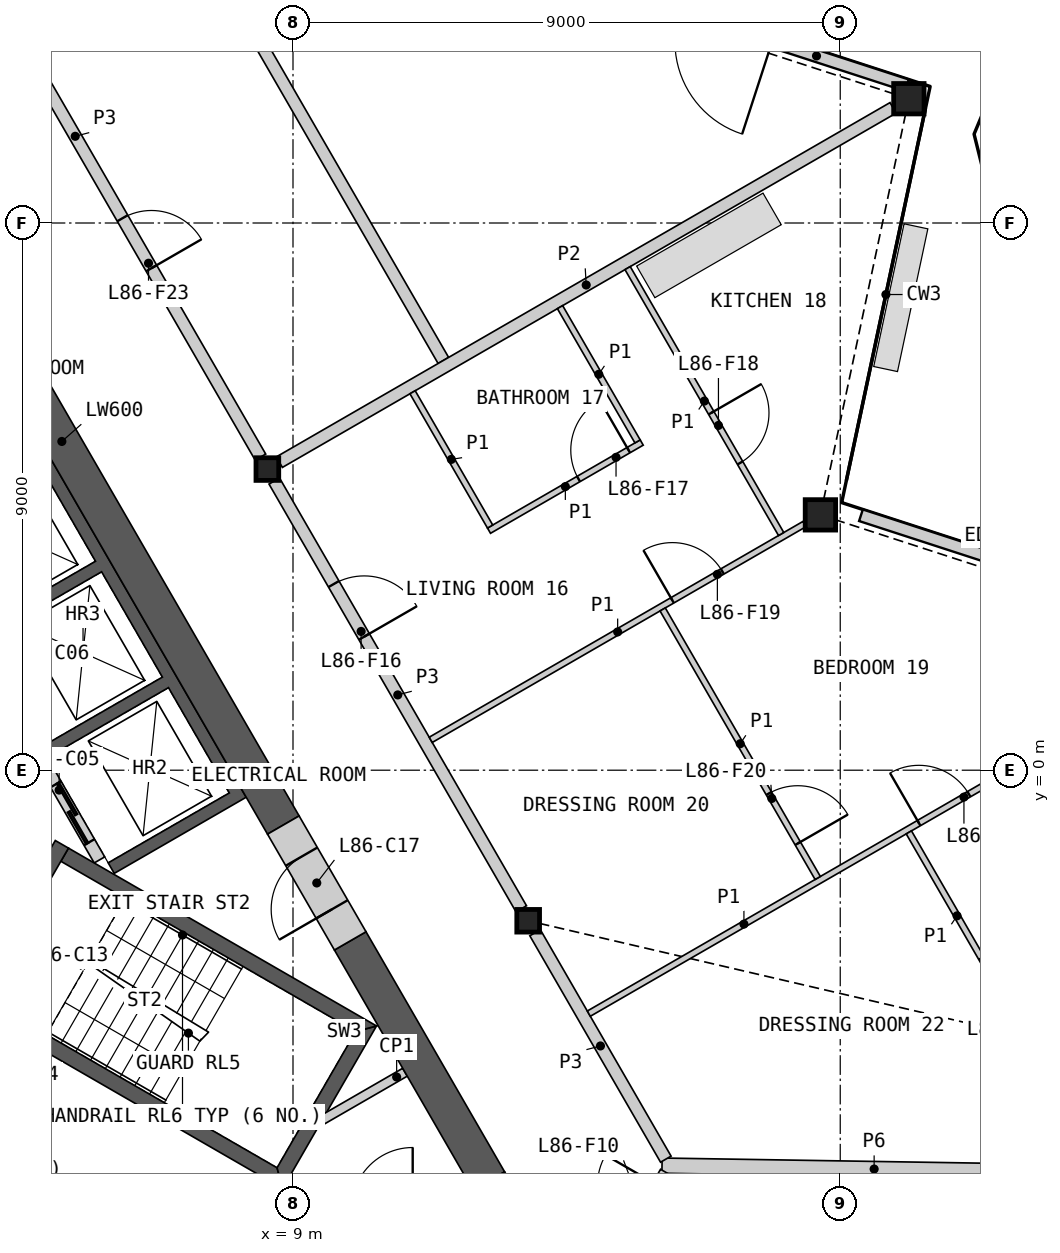
"""IFC4 building model, lengths in metres.
Left out: names, types, materials, properties, quantities, classifications, styles, units other than length and angle.
Written with IfcOpenShell. Run it as: python <this file> out.ifc"""

import sys

from ifc_helpers import new_model, si_unit, direction, frame, frame_2d, origin, origin_2d, place, context, subcontext, project, spatial, polyline, rectangle, hollow_rectangle, i_section, outline, extrude, element, fill, save


model = new_model("IFC4")
c1 = context("Model", 3, precision=1e-05, world=origin(), true_north=direction((0.0, 1.0)))
c2 = subcontext(c1, "Body", "Model", "MODEL_VIEW")
j1 = project(units=[si_unit("LENGTHUNIT", "METRE"), si_unit("PLANEANGLEUNIT", "RADIAN")], contexts=[c1])
p1 = place(None, origin())
s1 = spatial("IfcSite", under=j1, at=p1, CompositionType="ELEMENT")
p2 = place(p1, origin())
s2 = spatial("IfcBuilding", under=s1, at=p2, CompositionType="ELEMENT")
p3 = place(p2, frame((0.0, 0.0, 381.4)))
s3 = spatial("IfcBuildingStorey", under=s2, at=p3, CompositionType="ELEMENT", Elevation=381.4)
for number, where, z_axis, x_axis in (
    (1, (17.674, 4.199, 0.0), (0.0, 0.0, 1.0), (1.0, 0.0, 0.0)),
    (2, (19.129, 11.044, 0.0), (0.0, 0.0, 1.0), (1.0, 0.0, 0.0)),
):
    element("IfcColumn", number, at=place(p3, frame(where, z_axis=z_axis, x_axis=x_axis)), inside=s3, PredefinedType="COLUMN", context=c2, shape_type="SweptSolid", body=[
        extrude(hollow_rectangle(XDim=0.5, YDim=0.5, WallThickness=0.03, at=origin_2d()), origin(), (0.0, 0.0, 1.0), 3.4),
    ])
for number, where, z_axis, x_axis in (
    (3, (12.868, -2.476, 0.0), (0.0, 0.0, 1.0), (1.0, 0.0, 0.0)),
    (4, (8.578, 4.953, 0.0), (0.0, 0.0, 1.0), (1.0, 0.0, 0.0)),
):
    element("IfcColumn", number, at=place(p3, frame(where, z_axis=z_axis, x_axis=x_axis)), inside=s3, PredefinedType="COLUMN", context=c2, shape_type="SweptSolid", body=[
        extrude(i_section(OverallWidth=0.374, OverallDepth=0.372, WebThickness=0.016, FlangeThickness=0.026, at=origin_2d()), origin(), (0.0, 0.0, 1.0), 3.4),
    ])
p4 = place(p3, frame((24.3, 2.257, 0.0), z_axis=(0.0, 0.0, 1.0), x_axis=(-0.951060123915, 0.309005891041, 0.0)))
e5 = element("IfcWall", 5, at=p4, inside=s3, PredefinedType="SOLIDWALL", context=c2, shape_type="SweptSolid", body=[
    extrude(rectangle(XDim=6.265, YDim=0.2, at=frame_2d((3.133, 0.0))), origin(), (0.0, 0.0, 1.0), 2.634),
])
p5 = place(p4, frame((2.333, 0.0, 0.0)))
e6 = element("IfcOpeningElement", 6, at=p5, cuts=e5, PredefinedType="OPENING", context=c2, shape_type="SweptSolid", body=[
    extrude(rectangle(XDim=1.6, YDim=2.25, at=frame_2d((0.8, 1.125))), frame((0.0, 0.11, 0.0), z_axis=(0.0, -1.0, 0.0), x_axis=(1.0, 0.0, 0.0)), (0.0, 0.0, 1.0), 0.22),
])
p6 = place(p3, frame((19.099, 11.264, 0.0), z_axis=(0.0, 0.0, 1.0), x_axis=(-0.951056402988, 0.3090173431, 0.0)))
e7 = element("IfcWall", 7, at=p6, inside=s3, PredefinedType="SOLIDWALL", context=c2, shape_type="SweptSolid", body=[
    extrude(rectangle(XDim=6.265, YDim=0.2, at=frame_2d((3.133, 0.0))), origin(), (0.0, 0.0, 1.0), 2.634),
])
p7 = place(p6, frame((2.333, 0.0, 0.0)))
e8 = element("IfcOpeningElement", 8, at=p7, cuts=e7, PredefinedType="OPENING", context=c2, shape_type="SweptSolid", body=[
    extrude(rectangle(XDim=1.6, YDim=2.25, at=frame_2d((0.8, 1.125))), frame((0.0, 0.11, 0.0), z_axis=(0.0, -1.0, 0.0), x_axis=(1.0, 0.0, 0.0)), (0.0, 0.0, 1.0), 0.22),
])
p8 = place(p3, origin())
e9 = element("IfcWall", 9, at=p8, inside=s3, PredefinedType="SHEAR", context=c2, shape_type="SweptSolid", body=[
    extrude(outline(polyline([(1.561, 6.097), (3.731, 7.35), (8.231, -0.444), (6.061, -1.697), (5.96, -1.524), (7.952, -0.374), (6.952, 1.358), (4.96, 0.208), (4.861, 0.381), (6.852, 1.531), (5.852, 3.263), (3.861, 2.113), (3.76, 2.287), (5.752, 3.437), (4.752, 5.169), (2.76, 4.019), (2.66, 4.192), (4.652, 5.342), (3.652, 7.074), (1.66, 5.924), (1.561, 6.097)])), origin(), (0.0, 0.0, 1.0), 3.1),
])
p9 = place(p3, frame((5.817, -1.476, 0.0), z_axis=(0.0, 0.0, 1.0), x_axis=(-0.500002616675, 0.866023893041, 0.0)))
e10 = element("IfcWall", 10, at=p9, inside=s3, PredefinedType="SOLIDWALL", context=c2, shape_type="SweptSolid", body=[
    extrude(rectangle(XDim=8.373, YDim=0.2, at=frame_2d((4.187, 0.0))), origin(), (0.0, 0.0, 1.0), 3.1),
])
p10 = place(p9, frame((0.337, 0.0, 0.0)))
e11 = element("IfcOpeningElement", 11, at=p10, cuts=e10, PredefinedType="OPENING", context=c2, shape_type="SweptSolid", body=[
    extrude(rectangle(XDim=1.1, YDim=2.1, at=frame_2d((0.55, 1.05))), frame((0.0, 0.11, 0.0), z_axis=(0.0, -1.0, 0.0), x_axis=(1.0, 0.0, 0.0)), (0.0, 0.0, 1.0), 0.22),
])
p11 = place(p9, frame((2.537, 0.0, 0.0)))
e12 = element("IfcOpeningElement", 12, at=p11, cuts=e10, PredefinedType="OPENING", context=c2, shape_type="SweptSolid", body=[
    extrude(rectangle(XDim=1.1, YDim=2.1, at=frame_2d((0.55, 1.05))), frame((0.0, 0.11, 0.0), z_axis=(0.0, -1.0, 0.0), x_axis=(1.0, 0.0, 0.0)), (0.0, 0.0, 1.0), 0.22),
])
p12 = place(p9, frame((4.737, 0.0, 0.0)))
e13 = element("IfcOpeningElement", 13, at=p12, cuts=e10, PredefinedType="OPENING", context=c2, shape_type="SweptSolid", body=[
    extrude(rectangle(XDim=1.1, YDim=2.1, at=frame_2d((0.55, 1.05))), frame((0.0, 0.11, 0.0), z_axis=(0.0, -1.0, 0.0), x_axis=(1.0, 0.0, 0.0)), (0.0, 0.0, 1.0), 0.22),
])
p13 = place(p9, frame((7.037, 0.0, 0.0)))
e14 = element("IfcOpeningElement", 14, at=p13, cuts=e10, PredefinedType="OPENING", context=c2, shape_type="SweptSolid", body=[
    extrude(rectangle(XDim=0.9, YDim=2.1, at=frame_2d((0.45, 1.05))), frame((0.0, 0.11, 0.0), z_axis=(0.0, -1.0, 0.0), x_axis=(1.0, 0.0, 0.0)), (0.0, 0.0, 1.0), 0.22),
])
p14 = place(p3, origin())
e15 = element("IfcWall", 15, at=p14, inside=s3, PredefinedType="SHEAR", context=c2, shape_type="SweptSolid", body=[
    extrude(outline(polyline([(3.763, -3.956), (8.83, -6.881), (8.738, -6.539), (3.888, -3.739), (3.763, -3.956)])), origin(), (0.0, 0.0, 1.0), 3.1),
])
p15 = place(p3, origin())
e16 = element("IfcWall", 16, at=p15, inside=s3, PredefinedType="SHEAR", context=c2, shape_type="SweptSolid", body=[
    extrude(outline(polyline([(8.83, -6.881), (10.374, -4.206), (10.032, -4.298), (8.738, -6.539), (8.83, -6.881)])), origin(), (0.0, 0.0, 1.0), 3.1),
])
p16 = place(p3, origin())
e17 = element("IfcWall", 17, at=p16, inside=s3, PredefinedType="SHEAR", context=c2, shape_type="SweptSolid", body=[
    extrude(outline(polyline([(10.032, -4.298), (10.374, -4.206), (5.307, -1.281), (5.182, -1.498), (10.032, -4.298)])), origin(), (0.0, 0.0, 1.0), 3.1),
])
p17 = place(p3, frame((3.655, -3.893, 0.0), z_axis=(0.0, 0.0, 1.0), x_axis=(0.499982516597, 0.866035497597, 0.0)))
e18 = element("IfcWall", 18, at=p17, inside=s3, PredefinedType="SHEAR", context=c2, shape_type="SweptSolid", body=[
    extrude(rectangle(XDim=3.088, YDim=0.25, at=frame_2d((1.544, 0.0))), origin(), (0.0, 0.0, 1.0), 3.1),
])
p18 = place(p17, frame((0.994, 0.0, 0.0)))
e19 = element("IfcOpeningElement", 19, at=p18, cuts=e18, PredefinedType="OPENING", context=c2, shape_type="SweptSolid", body=[
    extrude(rectangle(XDim=1.1, YDim=2.1, at=frame_2d((0.55, 1.05))), frame((0.0, 0.135, 0.0), z_axis=(0.0, -1.0, 0.0), x_axis=(1.0, 0.0, 0.0)), (0.0, 0.0, 1.0), 0.27),
])
p19 = place(p3, frame((10.842, -4.967, 0.0), z_axis=(0.0, 0.0, 1.0), x_axis=(-0.866098216386, -0.499873863663, 0.0)))
e20 = element("IfcWall", 20, at=p19, inside=s3, PredefinedType="PARTITIONING", context=c2, shape_type="SweptSolid", body=[
    extrude(rectangle(XDim=1.582, YDim=0.15, at=frame_2d((0.791, 0.0))), origin(), (0.0, 0.0, 1.0), 3.1),
])
p20 = place(p3, frame((8.841, -0.902, 0.0), z_axis=(0.0, 0.0, 1.0), x_axis=(-0.499995618375, 0.866027933502, 0.0)))
e21 = element("IfcWall", 21, at=p20, inside=s3, PredefinedType="SHEAR", context=c2, shape_type="SweptSolid", body=[
    extrude(rectangle(XDim=14.571, YDim=0.6, at=frame_2d((7.285, 0.0))), origin(), (0.0, 0.0, 1.0), 3.1),
])
p21 = place(p3, frame((12.221, -6.756, 0.0), z_axis=(0.0, 0.0, 1.0), x_axis=(-0.500020646047, 0.866013483456, 0.0)))
e22 = element("IfcWall", 22, at=p21, inside=s3, PredefinedType="SHEAR", context=c2, shape_type="SweptSolid", body=[
    extrude(rectangle(XDim=4.559, YDim=0.6, at=frame_2d((2.28, 0.0))), origin(), (0.0, 0.0, 1.0), 3.1),
])
p22 = place(p3, origin())
e23 = element("IfcWall", 23, at=p22, inside=s3, PredefinedType="SHEAR", context=c2, shape_type="SweptSolid", body=[
    extrude(outline(polyline([(11.961, -7.506), (11.961, -6.906), (12.48, -6.606), (13.0, -7.506), (11.961, -7.506)])), origin(), (0.0, 0.0, 1.0), 3.1),
])
p23 = place(p3, frame((9.941, -2.807, 0.0), z_axis=(0.0, 0.0, 1.0), x_axis=(-0.499994660107, 0.866028486751, 0.0)))
e24 = element("IfcWall", 24, at=p23, inside=s3, PredefinedType="SHEAR", context=c2, shape_type="SweptSolid", body=[
    extrude(rectangle(XDim=2.2, YDim=0.6, at=frame_2d((1.1, 0.0))), origin(), (0.0, 0.0, 1.0), 3.1),
])
p24 = place(p23, frame((0.6, 0.0, 0.0)))
e25 = element("IfcOpeningElement", 25, at=p24, cuts=e24, PredefinedType="OPENING", context=c2, shape_type="SweptSolid", body=[
    extrude(rectangle(XDim=1.0, YDim=2.1, at=frame_2d((0.5, 1.05))), frame((0.0, 0.31, 0.0), z_axis=(0.0, -1.0, 0.0), x_axis=(1.0, 0.0, 0.0)), (0.0, 0.0, 1.0), 0.62),
])
p25 = place(p3, frame((15.069, -6.503, 0.0), z_axis=(0.0, 0.0, 1.0), x_axis=(0.999870484296, -0.016093931549, 0.0)))
e26 = element("IfcWall", 26, at=p25, inside=s3, PredefinedType="PARTITIONING", context=c2, shape_type="SweptSolid", body=[
    extrude(rectangle(XDim=13.956, YDim=0.25, at=frame_2d((6.978, 0.0))), origin(), (0.0, 0.0, 1.0), 2.33),
])
p26 = place(p3, frame((4.403, 12.185, 0.0), z_axis=(0.0, 0.0, 1.0), x_axis=(0.499992155518, -0.866029932751, 0.0)))
e27 = element("IfcWall", 27, at=p26, inside=s3, PredefinedType="PARTITIONING", context=c2, shape_type="SweptSolid", body=[
    extrude(rectangle(XDim=8.123, YDim=0.2, at=frame_2d((4.062, 0.0))), origin(), (0.0, 0.0, 1.0), 3.1),
])
p27 = place(p26, frame((3.587, 0.0, 0.0)))
e28 = element("IfcOpeningElement", 28, at=p27, cuts=e27, PredefinedType="OPENING", context=c2, shape_type="SweptSolid", body=[
    extrude(rectangle(XDim=0.95, YDim=2.1, at=frame_2d((0.475, 1.05))), frame((0.0, 0.11, 0.0), z_axis=(0.0, -1.0, 0.0), x_axis=(1.0, 0.0, 0.0)), (0.0, 0.0, 1.0), 0.22),
])
p28 = place(p3, frame((8.692, 4.756, 0.0), z_axis=(0.0, 0.0, 1.0), x_axis=(0.500001682468, -0.866024432409, 0.0)))
e29 = element("IfcWall", 29, at=p28, inside=s3, PredefinedType="PARTITIONING", context=c2, shape_type="SweptSolid", body=[
    extrude(rectangle(XDim=8.124, YDim=0.2, at=frame_2d((4.062, 0.0))), origin(), (0.0, 0.0, 1.0), 3.1),
])
p29 = place(p28, frame((1.956, 0.0, 0.0)))
e30 = element("IfcOpeningElement", 30, at=p29, cuts=e29, PredefinedType="OPENING", context=c2, shape_type="SweptSolid", body=[
    extrude(rectangle(XDim=1.0, YDim=2.1, at=frame_2d((0.5, 1.05))), frame((0.0, 0.11, 0.0), z_axis=(0.0, -1.0, 0.0), x_axis=(1.0, 0.0, 0.0)), (0.0, 0.0, 1.0), 0.22),
])
p30 = place(p3, frame((12.981, -2.673, 0.0), z_axis=(0.0, 0.0, 1.0), x_axis=(0.499986217557, -0.866033360935, 0.0)))
e31 = element("IfcWall", 31, at=p30, inside=s3, PredefinedType="PARTITIONING", context=c2, shape_type="SweptSolid", body=[
    extrude(rectangle(XDim=4.3, YDim=0.2, at=frame_2d((2.15, 0.0))), origin(), (0.0, 0.0, 1.0), 3.1),
])
p31 = place(p3, frame((13.281, -9.819, 0.0), z_axis=(0.0, 0.0, 1.0), x_axis=(0.499948957823, 0.866054870994, 0.0)))
e32 = element("IfcWall", 32, at=p31, inside=s3, PredefinedType="PARTITIONING", context=c2, shape_type="SweptSolid", body=[
    extrude(rectangle(XDim=3.701, YDim=0.2, at=frame_2d((1.851, 0.0))), origin(), (0.0, 0.0, 1.0), 3.1),
])
p32 = place(p31, frame((2.451, 0.0, 0.0)))
e33 = element("IfcOpeningElement", 33, at=p32, cuts=e32, PredefinedType="OPENING", context=c2, shape_type="SweptSolid", body=[
    extrude(rectangle(XDim=1.0, YDim=2.1, at=frame_2d((0.5, 1.05))), frame((0.0, 0.11, 0.0), z_axis=(0.0, -1.0, 0.0), x_axis=(1.0, 0.0, 0.0)), (0.0, 0.0, 1.0), 0.22),
])
p33 = place(p3, frame((3.926, 19.811, 0.0), z_axis=(0.0, 0.0, 1.0), x_axis=(0.500001082559, -0.866024778768, 0.0)))
e34 = element("IfcWall", 34, at=p33, inside=s3, PredefinedType="PARTITIONING", context=c2, shape_type="SweptSolid", body=[
    extrude(rectangle(XDim=15.094, YDim=0.2, at=frame_2d((7.547, 0.0))), origin(), (0.0, 0.0, 1.0), 2.33),
])
p34 = place(p33, frame((3.761, 0.0, 0.0)))
e35 = element("IfcOpeningElement", 35, at=p34, cuts=e34, PredefinedType="OPENING", context=c2, shape_type="SweptSolid", body=[
    extrude(rectangle(XDim=0.95, YDim=2.1, at=frame_2d((0.475, 1.05))), frame((0.0, 0.11, 0.0), z_axis=(0.0, -1.0, 0.0), x_axis=(1.0, 0.0, 0.0)), (0.0, 0.0, 1.0), 0.22),
])
p35 = place(p3, frame((8.775, 5.066, 0.0), z_axis=(0.0, 0.0, 1.0), x_axis=(0.866023724155, 0.500002909193, 0.0)))
e36 = element("IfcWall", 36, at=p35, inside=s3, PredefinedType="PARTITIONING", context=c2, shape_type="SweptSolid", body=[
    extrude(rectangle(XDim=11.655, YDim=0.2, at=frame_2d((5.827, 0.0))), origin(), (0.0, 0.0, 1.0), 2.33),
])
p36 = place(p3, frame((13.865, -4.004, 0.0), z_axis=(0.0, 0.0, 1.0), x_axis=(0.866023404247, 0.500003463284, 0.0)))
e37 = element("IfcWall", 37, at=p36, inside=s3, PredefinedType="PARTITIONING", context=c2, shape_type="SweptSolid", body=[
    extrude(rectangle(XDim=11.782, YDim=0.1, at=frame_2d((5.891, 0.0))), origin(), (0.0, 0.0, 1.0), 2.33),
])
p37 = place(p36, frame((6.269, 0.0, 0.0)))
e38 = element("IfcOpeningElement", 38, at=p37, cuts=e37, PredefinedType="OPENING", context=c2, shape_type="SweptSolid", body=[
    extrude(rectangle(XDim=0.95, YDim=2.1, at=frame_2d((0.475, 1.05))), frame((0.0, 0.06, 0.0), z_axis=(0.0, -1.0, 0.0), x_axis=(1.0, 0.0, 0.0)), (0.0, 0.0, 1.0), 0.12),
])
p38 = place(p3, frame((11.265, 0.5, 0.0), z_axis=(0.0, 0.0, 1.0), x_axis=(0.866033839264, 0.499985389037, 0.0)))
e39 = element("IfcWall", 39, at=p38, inside=s3, PredefinedType="PARTITIONING", context=c2, shape_type="SweptSolid", body=[
    extrude(rectangle(XDim=7.1, YDim=0.1, at=frame_2d((3.55, 0.0))), origin(), (0.0, 0.0, 1.0), 2.33),
])
p39 = place(p38, frame((4.588, 0.0, 0.0)))
e40 = element("IfcOpeningElement", 40, at=p39, cuts=e39, PredefinedType="OPENING", context=c2, shape_type="SweptSolid", body=[
    extrude(rectangle(XDim=0.95, YDim=2.1, at=frame_2d((0.475, 1.05))), frame((0.0, 0.06, 0.0), z_axis=(0.0, -1.0, 0.0), x_axis=(1.0, 0.0, 0.0)), (0.0, 0.0, 1.0), 0.12),
])
p40 = place(p3, frame((19.128, -1.023, 0.0), z_axis=(0.0, 0.0, 1.0), x_axis=(0.499991387631, -0.866030376081, 0.0)))
e41 = element("IfcWall", 41, at=p40, inside=s3, PredefinedType="PARTITIONING", context=c2, shape_type="SweptSolid", body=[
    extrude(rectangle(XDim=6.339, YDim=0.1, at=frame_2d((3.169, 0.0))), origin(), (0.0, 0.0, 1.0), 2.33),
])
p41 = place(p40, frame((2.389, 0.0, 0.0)))
e42 = element("IfcOpeningElement", 42, at=p41, cuts=e41, PredefinedType="OPENING", context=c2, shape_type="SweptSolid", body=[
    extrude(rectangle(XDim=0.95, YDim=2.1, at=frame_2d((0.475, 1.05))), frame((0.0, 0.06, 0.0), z_axis=(0.0, -1.0, 0.0), x_axis=(1.0, 0.0, 0.0)), (0.0, 0.0, 1.0), 0.12),
])
p42 = place(p3, frame((15.08, 2.644, 0.0), z_axis=(0.0, 0.0, 1.0), x_axis=(0.500005610874, -0.86602216432, 0.0)))
e43 = element("IfcWall", 43, at=p42, inside=s3, PredefinedType="PARTITIONING", context=c2, shape_type="SweptSolid", body=[
    extrude(rectangle(XDim=5.1, YDim=0.1, at=frame_2d((2.55, 0.0))), origin(), (0.0, 0.0, 1.0), 2.33),
])
p43 = place(p42, frame((3.494, 0.0, 0.0)))
e44 = element("IfcOpeningElement", 44, at=p43, cuts=e43, PredefinedType="OPENING", context=c2, shape_type="SweptSolid", body=[
    extrude(rectangle(XDim=0.95, YDim=2.1, at=frame_2d((0.475, 1.05))), frame((0.0, 0.06, 0.0), z_axis=(0.0, -1.0, 0.0), x_axis=(1.0, 0.0, 0.0)), (0.0, 0.0, 1.0), 0.12),
])
p44 = place(p3, frame((14.503, 8.258, 0.0), z_axis=(0.0, 0.0, 1.0), x_axis=(0.500012591307, -0.866018134068, 0.0)))
e45 = element("IfcWall", 45, at=p44, inside=s3, PredefinedType="PARTITIONING", context=c2, shape_type="SweptSolid", body=[
    extrude(rectangle(XDim=5.05, YDim=0.1, at=frame_2d((2.525, 0.0))), origin(), (0.0, 0.0, 1.0), 2.33),
])
p45 = place(p44, frame((2.75, 0.0, 0.0)))
e46 = element("IfcOpeningElement", 46, at=p45, cuts=e45, PredefinedType="OPENING", context=c2, shape_type="SweptSolid", body=[
    extrude(rectangle(XDim=0.95, YDim=2.1, at=frame_2d((0.475, 1.05))), frame((0.0, 0.06, 0.0), z_axis=(0.0, -1.0, 0.0), x_axis=(1.0, 0.0, 0.0)), (0.0, 0.0, 1.0), 0.12),
])
p46 = place(p3, frame((12.223, 3.939, 0.0), z_axis=(0.0, 0.0, 1.0), x_axis=(0.866032775405, 0.499987231761, 0.0)))
e47 = element("IfcWall", 47, at=p46, inside=s3, PredefinedType="PARTITIONING", context=c2, shape_type="SweptSolid", body=[
    extrude(rectangle(XDim=2.9, YDim=0.1, at=frame_2d((1.45, 0.0))), origin(), (0.0, 0.0, 1.0), 2.33),
])
p47 = place(p46, frame((1.7, 0.0, 0.0)))
e48 = element("IfcOpeningElement", 48, at=p47, cuts=e47, PredefinedType="OPENING", context=c2, shape_type="SweptSolid", body=[
    extrude(rectangle(XDim=0.95, YDim=2.1, at=frame_2d((0.475, 1.05))), frame((0.0, 0.06, 0.0), z_axis=(0.0, -1.0, 0.0), x_axis=(1.0, 0.0, 0.0)), (0.0, 0.0, 1.0), 0.12),
])
for number, where, z_axis, x_axis in (
    (49, (10.967, 6.216, 0.0), (0.0, 0.0, 1.0), (0.5, -0.866, 0.0)),
    (50, (13.392, 7.616, 0.0), (0.0, 0.0, 1.0), (0.5, -0.866, 0.0)),
):
    element("IfcWall", number, at=place(p3, frame(where, z_axis=z_axis, x_axis=x_axis)), inside=s3, PredefinedType="PARTITIONING", context=c2, shape_type="SweptSolid", body=[
        extrude(rectangle(XDim=2.55, YDim=0.1, at=frame_2d((1.275, 0.0))), origin(), (0.0, 0.0, 1.0), 2.33),
    ])
p48 = place(p10, origin())
e51 = element("IfcDoor", 51, at=p48, inside=s3, OperationType="SLIDING_TO_LEFT", PredefinedType="DOOR", context=c2, shape_type="SweptSolid", body=[
    extrude(rectangle(XDim=1.1, YDim=2.1, at=frame_2d((0.55, 1.05))), frame((0.0, 0.025, 0.0), z_axis=(0.0, -1.0, 0.0), x_axis=(1.0, 0.0, 0.0)), (0.0, 0.0, 1.0), 0.05),
])
fill(e11, e51)
p49 = place(p24, origin())
e52 = element("IfcDoor", 52, at=p49, inside=s3, OperationType="SINGLE_SWING_LEFT", PredefinedType="DOOR", context=c2, shape_type="SweptSolid", body=[
    extrude(rectangle(XDim=1.0, YDim=2.1, at=frame_2d((0.5, 1.05))), frame((0.0, 0.055, 0.0), z_axis=(0.0, -1.0, 0.0), x_axis=(1.0, 0.0, 0.0)), (0.0, 0.0, 1.0), 0.05),
])
fill(e25, e52)
p50 = place(p29, origin())
e53 = element("IfcDoor", 53, at=p50, inside=s3, OperationType="SINGLE_SWING_RIGHT", PredefinedType="DOOR", context=c2, shape_type="SweptSolid", body=[
    extrude(rectangle(XDim=1.0, YDim=2.1, at=frame_2d((0.5, 1.05))), frame((0.0, 0.025, 0.0), z_axis=(0.0, -1.0, 0.0), x_axis=(1.0, 0.0, 0.0)), (0.0, 0.0, 1.0), 0.05),
])
fill(e30, e53)
p51 = place(p47, origin())
e54 = element("IfcDoor", 54, at=p51, inside=s3, OperationType="SINGLE_SWING_RIGHT", PredefinedType="DOOR", context=c2, shape_type="SweptSolid", body=[
    extrude(rectangle(XDim=0.95, YDim=2.1, at=frame_2d((0.475, 1.05))), frame((0.0, 0.025, 0.0), z_axis=(0.0, -1.0, 0.0), x_axis=(1.0, 0.0, 0.0)), (0.0, 0.0, 1.0), 0.05),
])
fill(e48, e54)
p52 = place(p45, origin())
e55 = element("IfcDoor", 55, at=p52, inside=s3, OperationType="SINGLE_SWING_LEFT", PredefinedType="DOOR", context=c2, shape_type="SweptSolid", body=[
    extrude(rectangle(XDim=0.95, YDim=2.1, at=frame_2d((0.475, 1.05))), frame((0.0, 0.025, 0.0), z_axis=(0.0, -1.0, 0.0), x_axis=(1.0, 0.0, 0.0)), (0.0, 0.0, 1.0), 0.05),
])
fill(e46, e55)
p53 = place(p39, origin())
e56 = element("IfcDoor", 56, at=p53, inside=s3, OperationType="SINGLE_SWING_LEFT", PredefinedType="DOOR", context=c2, shape_type="SweptSolid", body=[
    extrude(rectangle(XDim=0.95, YDim=2.1, at=frame_2d((0.475, 1.05))), frame((0.0, 0.025, 0.0), z_axis=(0.0, -1.0, 0.0), x_axis=(1.0, 0.0, 0.0)), (0.0, 0.0, 1.0), 0.05),
])
fill(e40, e56)
p54 = place(p43, origin())
e57 = element("IfcDoor", 57, at=p54, inside=s3, OperationType="SINGLE_SWING_RIGHT", PredefinedType="DOOR", context=c2, shape_type="SweptSolid", body=[
    extrude(rectangle(XDim=0.95, YDim=2.1, at=frame_2d((0.475, 1.05))), frame((0.0, 0.025, 0.0), z_axis=(0.0, -1.0, 0.0), x_axis=(1.0, 0.0, 0.0)), (0.0, 0.0, 1.0), 0.05),
])
fill(e44, e57)
p55 = place(p37, origin())
e58 = element("IfcDoor", 58, at=p55, inside=s3, OperationType="SINGLE_SWING_LEFT", PredefinedType="DOOR", context=c2, shape_type="SweptSolid", body=[
    extrude(rectangle(XDim=0.95, YDim=2.1, at=frame_2d((0.475, 1.05))), frame((0.0, 0.025, 0.0), z_axis=(0.0, -1.0, 0.0), x_axis=(1.0, 0.0, 0.0)), (0.0, 0.0, 1.0), 0.05),
])
fill(e38, e58)
p56 = place(p41, origin())
e59 = element("IfcDoor", 59, at=p56, inside=s3, OperationType="SINGLE_SWING_RIGHT", PredefinedType="DOOR", context=c2, shape_type="SweptSolid", body=[
    extrude(rectangle(XDim=0.95, YDim=2.1, at=frame_2d((0.475, 1.05))), frame((0.0, 0.025, 0.0), z_axis=(0.0, -1.0, 0.0), x_axis=(1.0, 0.0, 0.0)), (0.0, 0.0, 1.0), 0.05),
])
fill(e42, e59)
p57 = place(p27, origin())
e60 = element("IfcDoor", 60, at=p57, inside=s3, OperationType="SINGLE_SWING_RIGHT", PredefinedType="DOOR", context=c2, shape_type="SweptSolid", body=[
    extrude(rectangle(XDim=0.95, YDim=2.1, at=frame_2d((0.475, 1.05))), frame((0.0, 0.025, 0.0), z_axis=(0.0, -1.0, 0.0), x_axis=(1.0, 0.0, 0.0)), (0.0, 0.0, 1.0), 0.05),
])
fill(e28, e60)
save(model, sys.argv[1])
